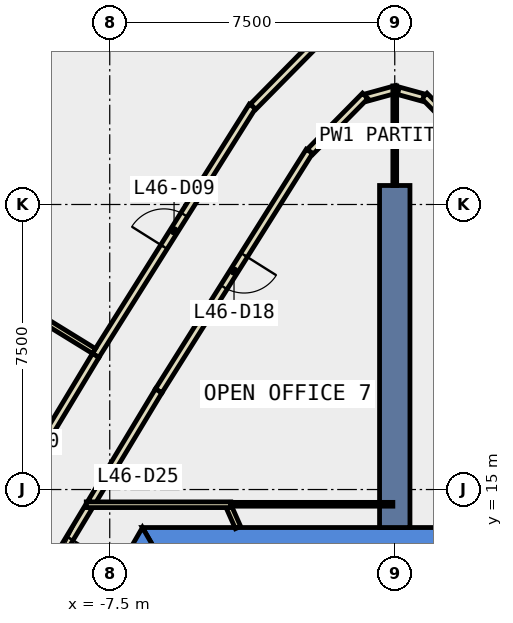
"""IFC4 building model, lengths in metres.
Left out: names, types, materials, properties, quantities, classifications, styles, units other than length and angle.
Written with IfcOpenShell. Run it as: python <this file> out.ifc"""

import sys

from ifc_helpers import new_model, si_unit, direction, frame, frame_2d, origin, place, context, subcontext, project, spatial, polyline, rectangle, outline, extrude, element, fill, save


model = new_model("IFC4")
c1 = context("Model", 3, precision=1e-05, world=origin(), true_north=direction((0.0, 1.0)))
c2 = subcontext(c1, "Body", "Model", "MODEL_VIEW")
j1 = project(units=[si_unit("LENGTHUNIT", "METRE"), si_unit("PLANEANGLEUNIT", "RADIAN")], contexts=[c1])
p1 = place(None, origin())
s1 = spatial("IfcSite", under=j1, at=p1, CompositionType="ELEMENT")
p2 = place(p1, origin())
s2 = spatial("IfcBuilding", under=s1, at=p2, CompositionType="ELEMENT")
p3 = place(p2, frame((0.0, 0.0, 206.6)))
s3 = spatial("IfcBuildingStorey", under=s2, at=p3, CompositionType="ELEMENT", Elevation=206.6)
p4 = place(p3, frame((0.0, 0.0, -0.4)))
e1 = element("IfcWall", 1, at=p4, inside=s3, PredefinedType="SHEAR", context=c2, shape_type="SweptSolid", body=[
    extrude(outline(polyline([(6.64, 14.0), (-6.64, 14.0), (-6.235, 13.3), (6.235, 13.3), (6.64, 14.0)])), origin(), (0.0, 0.0, 1.0), 4.2),
])
p5 = place(p3, frame((0.0, 0.0, -0.4)))
e2 = element("IfcWall", 2, at=p5, inside=s3, PredefinedType="SHEAR", context=c2, shape_type="SweptSolid", body=[
    extrude(outline(polyline([(-11.834, 5.002), (-11.228, 4.652), (-6.235, 13.3), (-6.64, 14.0), (-11.834, 5.002)])), origin(), (0.0, 0.0, 1.0), 4.2),
])
p6 = place(p3, frame((0.0, 14.0, -0.4), z_axis=(0.0, 0.0, 1.0), x_axis=(0.0, 1.0, 0.0)))
e3 = element("IfcWall", 3, at=p6, inside=s3, PredefinedType="SHEAR", context=c2, shape_type="SweptSolid", body=[
    extrude(rectangle(XDim=9.0, YDim=0.8, at=frame_2d((4.5, 0.0))), origin(), (0.0, 0.0, 1.0), 4.2),
])
p7 = place(p3, frame((-8.759, 28.29, 0.0), z_axis=(0.0, 0.0, 1.0), x_axis=(-0.532522107002, -0.84641609481, 0.0)))
e4 = element("IfcWall", 4, at=p7, inside=s3, PredefinedType="STANDARD", context=c2, shape_type="SweptSolid", body=[
    extrude(rectangle(XDim=7.273, YDim=0.3, at=frame_2d((3.636, 0.0))), origin(), (0.0, 0.0, 1.0), 3.8),
])
p8 = place(p7, frame((0.618, 0.0, 0.9)))
e5 = element("IfcOpeningElement", 5, at=p8, cuts=e4, PredefinedType="OPENING", context=c2, shape_type="SweptSolid", body=[
    extrude(rectangle(XDim=2.4, YDim=2.6, at=frame_2d((1.2, 1.3))), frame((0.0, 0.16, 0.0), z_axis=(0.0, -1.0, 0.0), x_axis=(1.0, 0.0, 0.0)), (0.0, 0.0, 1.0), 0.32),
])
p9 = place(p7, frame((4.255, 0.0, 0.9)))
e6 = element("IfcOpeningElement", 6, at=p9, cuts=e4, PredefinedType="OPENING", context=c2, shape_type="SweptSolid", body=[
    extrude(rectangle(XDim=2.4, YDim=2.6, at=frame_2d((1.2, 1.3))), frame((0.0, 0.16, 0.0), z_axis=(0.0, -1.0, 0.0), x_axis=(1.0, 0.0, 0.0)), (0.0, 0.0, 1.0), 0.32),
])
p10 = place(p3, frame((-8.057, 14.536, 0.0), z_axis=(0.0, 0.0, 1.0), x_axis=(-0.516268010323, -0.856427078926, 0.0)))
e7 = element("IfcWall", 7, at=p10, inside=s3, PredefinedType="PARTITIONING", context=c2, shape_type="SweptSolid", body=[
    extrude(rectangle(XDim=2.915, YDim=0.2, at=frame_2d((1.458, 0.0))), origin(), (0.0, 0.0, 1.0), 3.8),
])
p11 = place(p10, frame((0.958, 0.0, 0.0)))
e8 = element("IfcOpeningElement", 8, at=p11, cuts=e7, PredefinedType="OPENING", context=c2, shape_type="SweptSolid", body=[
    extrude(rectangle(XDim=1.0, YDim=2.1, at=frame_2d((0.5, 1.05))), frame((0.0, 0.11, 0.0), z_axis=(0.0, -1.0, 0.0), x_axis=(1.0, 0.0, 0.0)), (0.0, 0.0, 1.0), 0.22),
])
p12 = place(p3, frame((2.229, 23.887, 0.0), z_axis=(0.0, 0.0, 1.0), x_axis=(-0.702245482258, 0.711934886523, 0.0)))
e9 = element("IfcWall", 9, at=p12, inside=s3, PredefinedType="PARTITIONING", context=c2, shape_type="SweptSolid", body=[
    extrude(rectangle(XDim=2.066, YDim=0.2, at=frame_2d((1.033, 0.0))), origin(), (0.0, 0.0, 1.0), 3.8),
])
p13 = place(p3, frame((0.752, 25.313, 0.0), z_axis=(0.0, 0.0, 1.0), x_axis=(-0.964381816756, 0.264514104559, 0.0)))
e10 = element("IfcWall", 10, at=p13, inside=s3, PredefinedType="PARTITIONING", context=c2, shape_type="SweptSolid", body=[
    extrude(rectangle(XDim=0.68, YDim=0.2, at=frame_2d((0.34, 0.0))), origin(), (0.0, 0.0, 1.0), 3.8),
])
p14 = place(p3, frame((0.048, 25.533, 0.0), z_axis=(0.0, 0.0, 1.0), x_axis=(-0.964218556253, -0.265108611286, 0.0)))
e11 = element("IfcWall", 11, at=p14, inside=s3, PredefinedType="PARTITIONING", context=c2, shape_type="SweptSolid", body=[
    extrude(rectangle(XDim=0.83, YDim=0.2, at=frame_2d((0.415, 0.0))), origin(), (0.0, 0.0, 1.0), 3.8),
])
p15 = place(p3, frame((-0.778, 25.358, 0.0), z_axis=(0.0, 0.0, 1.0), x_axis=(-0.702245482258, -0.711934886523, 0.0)))
e12 = element("IfcWall", 12, at=p15, inside=s3, PredefinedType="PARTITIONING", context=c2, shape_type="SweptSolid", body=[
    extrude(rectangle(XDim=2.066, YDim=0.2, at=frame_2d((1.033, 0.0))), origin(), (0.0, 0.0, 1.0), 3.8),
])
p16 = place(p3, frame((-2.246, 23.9, 0.0), z_axis=(0.0, 0.0, 1.0), x_axis=(-0.532527247309, -0.846412860768, 0.0)))
e13 = element("IfcWall", 13, at=p16, inside=s3, PredefinedType="PARTITIONING", context=c2, shape_type="SweptSolid", body=[
    extrude(rectangle(XDim=7.449, YDim=0.2, at=frame_2d((3.725, 0.0))), origin(), (0.0, 0.0, 1.0), 3.8),
])
p17 = place(p16, frame((3.225, 0.0, 0.0)))
e14 = element("IfcOpeningElement", 14, at=p17, cuts=e13, PredefinedType="OPENING", context=c2, shape_type="SweptSolid", body=[
    extrude(rectangle(XDim=1.0, YDim=2.1, at=frame_2d((0.5, 1.05))), frame((0.0, 0.11, 0.0), z_axis=(0.0, -1.0, 0.0), x_axis=(1.0, 0.0, 0.0)), (0.0, 0.0, 1.0), 0.22),
])
p18 = place(p3, frame((-6.213, 17.595, 0.0), z_axis=(0.0, 0.0, 1.0), x_axis=(-0.516121112316, -0.856515614231, 0.0)))
e15 = element("IfcWall", 15, at=p18, inside=s3, PredefinedType="PARTITIONING", context=c2, shape_type="SweptSolid", body=[
    extrude(rectangle(XDim=3.422, YDim=0.2, at=frame_2d((1.711, 0.0))), origin(), (0.0, 0.0, 1.0), 3.8),
])
p19 = place(p3, frame((-7.871, 18.528, 0.0), z_axis=(0.0, 0.0, 1.0), x_axis=(0.532587642146, 0.846374859878, 0.0)))
e16 = element("IfcWall", 16, at=p19, inside=s3, PredefinedType="PARTITIONING", context=c2, shape_type="SweptSolid", body=[
    extrude(rectangle(XDim=7.749, YDim=0.2, at=frame_2d((3.875, 0.0))), origin(), (0.0, 0.0, 1.0), 3.8),
])
p20 = place(p19, frame((3.375, 0.0, 0.0)))
e17 = element("IfcOpeningElement", 17, at=p20, cuts=e16, PredefinedType="OPENING", context=c2, shape_type="SweptSolid", body=[
    extrude(rectangle(XDim=1.0, YDim=2.1, at=frame_2d((0.5, 1.05))), frame((0.0, 0.11, 0.0), z_axis=(0.0, -1.0, 0.0), x_axis=(1.0, 0.0, 0.0)), (0.0, 0.0, 1.0), 0.22),
])
p21 = place(p3, frame((-3.727, 25.074, 0.0), z_axis=(0.0, 0.0, 1.0), x_axis=(0.702089218366, 0.712088989842, 0.0)))
e18 = element("IfcWall", 18, at=p21, inside=s3, PredefinedType="PARTITIONING", context=c2, shape_type="SweptSolid", body=[
    extrude(rectangle(XDim=2.783, YDim=0.2, at=frame_2d((1.392, 0.0))), origin(), (0.0, 0.0, 1.0), 3.8),
])
p22 = place(p3, frame((-12.025, 11.633, 0.0), z_axis=(0.0, 0.0, 1.0), x_axis=(0.516283129542, 0.856417964636, 0.0)))
e19 = element("IfcWall", 19, at=p22, inside=s3, PredefinedType="PARTITIONING", context=c2, shape_type="SweptSolid", body=[
    extrude(rectangle(XDim=8.05, YDim=0.2, at=frame_2d((4.025, 0.0))), origin(), (0.0, 0.0, 1.0), 3.8),
])
p23 = place(p22, frame((3.6, 0.0, 0.0)))
e20 = element("IfcOpeningElement", 20, at=p23, cuts=e19, PredefinedType="OPENING", context=c2, shape_type="SweptSolid", body=[
    extrude(rectangle(XDim=1.0, YDim=2.1, at=frame_2d((0.5, 1.05))), frame((0.0, 0.11, 0.0), z_axis=(0.0, -1.0, 0.0), x_axis=(1.0, 0.0, 0.0)), (0.0, 0.0, 1.0), 0.22),
])
p24 = place(p3, frame((-4.125, 14.0, 0.0), z_axis=(0.0, 0.0, 1.0), x_axis=(-0.404850841056, 0.914382740703, 0.0)))
e21 = element("IfcWall", 21, at=p24, inside=s3, PredefinedType="PARTITIONING", context=c2, shape_type="SweptSolid", body=[
    extrude(rectangle(XDim=0.581, YDim=0.15, at=frame_2d((0.291, 0.0))), origin(), (0.0, 0.0, 1.0), 3.8),
])
p25 = place(p3, frame((-4.316, 14.6, 0.0), z_axis=(0.0, 0.0, 1.0), x_axis=(-1.0, 0.0, 0.0)))
e22 = element("IfcWall", 22, at=p25, inside=s3, PredefinedType="PARTITIONING", context=c2, shape_type="SweptSolid", body=[
    extrude(rectangle(XDim=3.802, YDim=0.15, at=frame_2d((1.901, 0.0))), origin(), (0.0, 0.0, 1.0), 3.8),
])
p26 = place(p3, frame((-4.316, 14.612, 0.0), z_axis=(0.0, 0.0, 1.0), x_axis=(1.0, 0.0, 0.0)))
e23 = element("IfcWall", 23, at=p26, inside=s3, PredefinedType="PARTITIONING", context=c2, shape_type="SweptSolid", body=[
    extrude(rectangle(XDim=4.266, YDim=0.1, at=frame_2d((2.133, 0.0))), origin(), (0.0, 0.0, 1.0), 3.8),
])
p27 = place(p3, frame((0.0, 23.0, 0.0), z_axis=(0.0, 0.0, 1.0), x_axis=(0.0, 1.0, 0.0)))
e24 = element("IfcWall", 24, at=p27, inside=s3, PredefinedType="PARTITIONING", context=c2, shape_type="SweptSolid", body=[
    extrude(rectangle(XDim=2.62, YDim=0.1, at=frame_2d((1.31, 0.0))), origin(), (0.0, 0.0, 1.0), 3.8),
])
p28 = place(p3, frame((-7.916, 18.644, 0.0), z_axis=(0.0, 0.0, 1.0), x_axis=(-0.851543444049, 0.524284047914, 0.0)))
e25 = element("IfcWall", 25, at=p28, inside=s3, PredefinedType="PARTITIONING", context=c2, shape_type="SweptSolid", body=[
    extrude(rectangle(XDim=4.379, YDim=0.15, at=frame_2d((2.189, 0.0))), origin(), (0.0, 0.0, 1.0), 3.8),
])
p29 = place(p20, origin())
e26 = element("IfcDoor", 26, at=p29, inside=s3, OperationType="SINGLE_SWING_LEFT", PredefinedType="DOOR", context=c2, shape_type="SweptSolid", body=[
    extrude(rectangle(XDim=1.0, YDim=2.1, at=frame_2d((0.5, 1.05))), frame((0.0, 0.025, 0.0), z_axis=(0.0, -1.0, 0.0), x_axis=(1.0, 0.0, 0.0)), (0.0, 0.0, 1.0), 0.05),
])
fill(e17, e26)
p30 = place(p17, origin())
e27 = element("IfcDoor", 27, at=p30, inside=s3, OperationType="SINGLE_SWING_LEFT", PredefinedType="DOOR", context=c2, shape_type="SweptSolid", body=[
    extrude(rectangle(XDim=1.0, YDim=2.1, at=frame_2d((0.5, 1.05))), frame((0.0, 0.025, 0.0), z_axis=(0.0, -1.0, 0.0), x_axis=(1.0, 0.0, 0.0)), (0.0, 0.0, 1.0), 0.05),
])
fill(e14, e27)
p31 = place(p11, origin())
e28 = element("IfcDoor", 28, at=p31, inside=s3, OperationType="SINGLE_SWING_LEFT", PredefinedType="DOOR", context=c2, shape_type="SweptSolid", body=[
    extrude(rectangle(XDim=1.0, YDim=2.1, at=frame_2d((0.5, 1.05))), frame((0.0, 0.025, 0.0), z_axis=(0.0, -1.0, 0.0), x_axis=(1.0, 0.0, 0.0)), (0.0, 0.0, 1.0), 0.05),
])
fill(e8, e28)
save(model, sys.argv[1])
